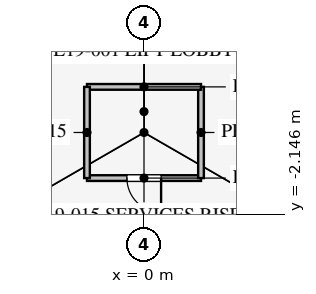
"""IFC4 building model, lengths in metres.
Left out: names, types, materials, properties, quantities, classifications, styles, units other than length and angle.
Written with IfcOpenShell. Run it as: python <this file> out.ifc"""

import sys

from ifc_helpers import new_model, si_unit, direction, frame, frame_2d, origin, place, context, subcontext, project, spatial, rectangle, extrude, element, fill, save


model = new_model("IFC4")
c1 = context("Model", 3, precision=1e-05, world=origin(), true_north=direction((0.0, 1.0)))
c2 = subcontext(c1, "Body", "Model", "MODEL_VIEW")
j1 = project(units=[si_unit("LENGTHUNIT", "METRE"), si_unit("PLANEANGLEUNIT", "RADIAN")], contexts=[c1])
p1 = place(None, origin())
s1 = spatial("IfcSite", under=j1, at=p1, CompositionType="ELEMENT")
p2 = place(p1, origin())
s2 = spatial("IfcBuilding", under=s1, at=p2, CompositionType="ELEMENT")
p3 = place(p2, frame((0.0, 0.0, 83.7)))
s3 = spatial("IfcBuildingStorey", under=s2, at=p3, CompositionType="ELEMENT", Elevation=83.7)
p4 = place(p3, frame((-1.5, -1.2, 0.0), z_axis=(0.0, 0.0, 1.0), x_axis=(1.0, 0.0, 0.0)))
e1 = element("IfcWall", 1, at=p4, inside=s3, PredefinedType="PARTITIONING", context=c2, shape_type="SweptSolid", body=[
    extrude(rectangle(XDim=3.0, YDim=0.15, at=frame_2d((1.5, 0.0))), origin(), (0.0, 0.0, 1.0), 4.0),
])
p5 = place(p4, frame((1.05, 0.0, 0.0)))
e2 = element("IfcOpeningElement", 2, at=p5, cuts=e1, PredefinedType="OPENING", context=c2, shape_type="SweptSolid", body=[
    extrude(rectangle(XDim=0.9, YDim=2.1, at=frame_2d((0.45, 1.05))), frame((0.0, 0.085, 0.0), z_axis=(0.0, -1.0, 0.0), x_axis=(1.0, 0.0, 0.0)), (0.0, 0.0, 1.0), 0.17),
])
p6 = place(p3, frame((1.5, -1.2, 0.0), z_axis=(0.0, 0.0, 1.0), x_axis=(0.0, 1.0, 0.0)))
e3 = element("IfcWall", 3, at=p6, inside=s3, PredefinedType="PARTITIONING", context=c2, shape_type="SweptSolid", body=[
    extrude(rectangle(XDim=2.4, YDim=0.15, at=frame_2d((1.2, 0.0))), origin(), (0.0, 0.0, 1.0), 4.0),
])
p7 = place(p3, frame((1.5, 1.2, 0.0), z_axis=(0.0, 0.0, 1.0), x_axis=(-1.0, 0.0, 0.0)))
e4 = element("IfcWall", 4, at=p7, inside=s3, PredefinedType="PARTITIONING", context=c2, shape_type="SweptSolid", body=[
    extrude(rectangle(XDim=3.0, YDim=0.15, at=frame_2d((1.5, 0.0))), origin(), (0.0, 0.0, 1.0), 4.0),
])
p8 = place(p3, frame((-1.5, 1.2, 0.0), z_axis=(0.0, 0.0, 1.0), x_axis=(0.0, -1.0, 0.0)))
e5 = element("IfcWall", 5, at=p8, inside=s3, PredefinedType="PARTITIONING", context=c2, shape_type="SweptSolid", body=[
    extrude(rectangle(XDim=2.4, YDim=0.15, at=frame_2d((1.2, 0.0))), origin(), (0.0, 0.0, 1.0), 4.0),
])
p9 = place(p5, frame((0.9, 0.0, 0.0), z_axis=(0.0, 0.0, 1.0), x_axis=(-1.0, 0.0, 0.0)))
e6 = element("IfcDoor", 6, at=p9, inside=s3, OperationType="SINGLE_SWING_LEFT", PredefinedType="DOOR", context=c2, shape_type="SweptSolid", body=[
    extrude(rectangle(XDim=0.9, YDim=2.1, at=frame_2d((0.45, 1.05))), frame((0.0, 0.025, 0.0), z_axis=(0.0, -1.0, 0.0), x_axis=(1.0, 0.0, 0.0)), (0.0, 0.0, 1.0), 0.05),
])
fill(e2, e6)
save(model, sys.argv[1])
